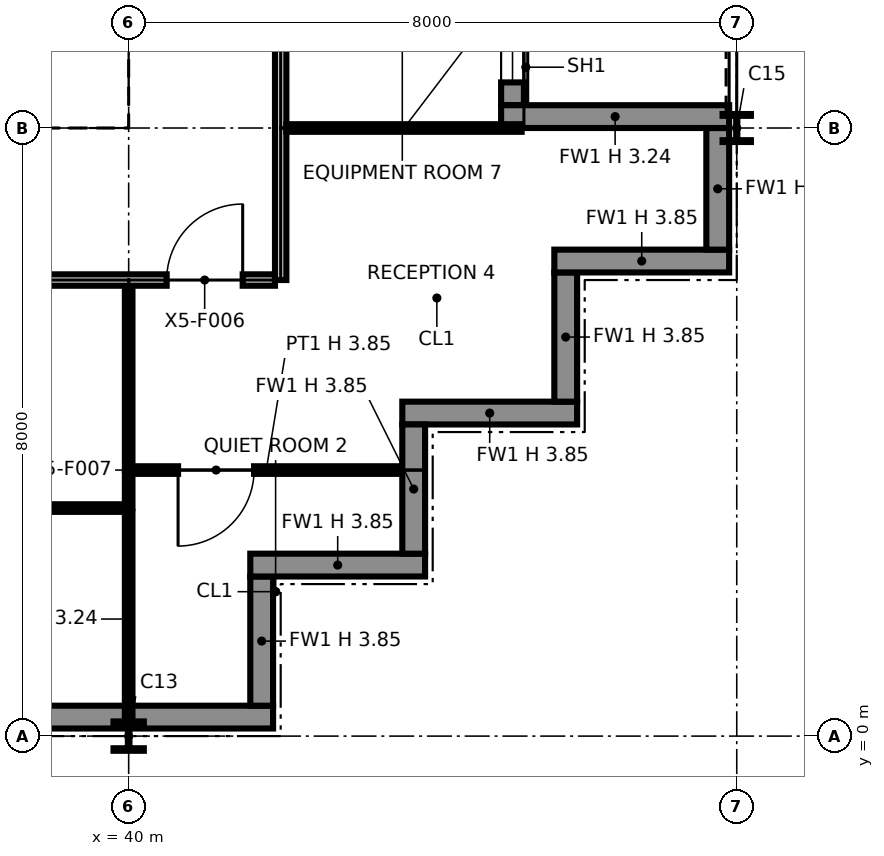
"""IFC4 building model, lengths in metres.
Left out: names, types, materials, properties, quantities, classifications, styles, units other than length and angle.
Written with IfcOpenShell. Run it as: python <this file> out.ifc"""

import sys

from ifc_helpers import new_model, si_unit, direction, frame, frame_2d, origin, origin_2d, place, context, subcontext, project, spatial, polyline, rectangle, i_section, outline, extrude, element, fill, save


model = new_model("IFC4")
c1 = context("Model", 3, precision=1e-05, world=origin(), true_north=direction((0.0, 1.0)))
c2 = subcontext(c1, "Body", "Model", "MODEL_VIEW")
j1 = project(units=[si_unit("LENGTHUNIT", "METRE"), si_unit("PLANEANGLEUNIT", "RADIAN")], contexts=[c1])
p1 = place(None, origin())
s1 = spatial("IfcSite", under=j1, at=p1, CompositionType="ELEMENT")
p2 = place(p1, origin())
s2 = spatial("IfcBuilding", under=s1, at=p2, CompositionType="ELEMENT")
p3 = place(p2, frame((0.0, 0.0, 283.0)))
s3 = spatial("IfcBuildingStorey", under=s2, at=p3, CompositionType="ELEMENT", Elevation=283.0)
p4 = place(p3, frame((40.0, 0.0, 0.0), z_axis=(0.0, 0.0, 1.0), x_axis=(1.0, 0.0, 0.0)))
e1 = element("IfcColumn", 1, at=p4, inside=s3, PredefinedType="COLUMN", context=c2, shape_type="SweptSolid", body=[
    extrude(i_section(OverallWidth=0.399, OverallDepth=0.386, WebThickness=0.021, FlangeThickness=0.033, at=origin_2d()), origin(), (0.0, 0.0, 1.0), 3.85),
])
p5 = place(p3, frame((40.0, 8.0, 0.0), z_axis=(0.0, 0.0, 1.0), x_axis=(1.0, 0.0, 0.0)))
e2 = element("IfcColumn", 2, at=p5, inside=s3, PredefinedType="COLUMN", context=c2, shape_type="SweptSolid", body=[
    extrude(i_section(OverallWidth=0.257, OverallDepth=0.363, WebThickness=0.013, FlangeThickness=0.022, at=origin_2d()), origin(), (0.0, 0.0, 1.0), 3.85),
])
p6 = place(p3, frame((48.0, 8.0, 0.0), z_axis=(0.0, 0.0, 1.0), x_axis=(1.0, 0.0, 0.0)))
e3 = element("IfcColumn", 3, at=p6, inside=s3, PredefinedType="COLUMN", context=c2, shape_type="SweptSolid", body=[
    extrude(i_section(OverallWidth=0.373, OverallDepth=0.368, WebThickness=0.015, FlangeThickness=0.024, at=origin_2d()), origin(), (0.0, 0.0, 1.0), 3.85),
])
p7 = place(p3, frame((32.0, 0.25, 0.0), z_axis=(0.0, 0.0, 1.0), x_axis=(1.0, 0.0, 0.0)))
e4 = element("IfcWall", 4, at=p7, inside=s3, PredefinedType="SOLIDWALL", context=c2, shape_type="SweptSolid", body=[
    extrude(rectangle(XDim=9.9, YDim=0.3, at=frame_2d((4.95, 0.0))), origin(), (0.0, 0.0, 1.0), 3.85),
])
p8 = place(p3, frame((41.75, 0.4, 0.0), z_axis=(0.0, 0.0, 1.0), x_axis=(0.0, 1.0, 0.0)))
e5 = element("IfcWall", 5, at=p8, inside=s3, PredefinedType="SOLIDWALL", context=c2, shape_type="SweptSolid", body=[
    extrude(rectangle(XDim=1.7, YDim=0.3, at=frame_2d((0.85, 0.0))), origin(), (0.0, 0.0, 1.0), 3.85),
])
p9 = place(p3, frame((41.6, 2.25, 0.0), z_axis=(0.0, 0.0, 1.0), x_axis=(1.0, 0.0, 0.0)))
e6 = element("IfcWall", 6, at=p9, inside=s3, PredefinedType="SOLIDWALL", context=c2, shape_type="SweptSolid", body=[
    extrude(rectangle(XDim=2.3, YDim=0.3, at=frame_2d((1.15, 0.0))), origin(), (0.0, 0.0, 1.0), 3.85),
])
p10 = place(p3, frame((43.75, 2.4, 0.0), z_axis=(0.0, 0.0, 1.0), x_axis=(0.0, 1.0, 0.0)))
e7 = element("IfcWall", 7, at=p10, inside=s3, PredefinedType="SOLIDWALL", context=c2, shape_type="SweptSolid", body=[
    extrude(rectangle(XDim=1.7, YDim=0.3, at=frame_2d((0.85, 0.0))), origin(), (0.0, 0.0, 1.0), 3.85),
])
p11 = place(p3, frame((43.6, 4.25, 0.0), z_axis=(0.0, 0.0, 1.0), x_axis=(1.0, 0.0, 0.0)))
e8 = element("IfcWall", 8, at=p11, inside=s3, PredefinedType="SOLIDWALL", context=c2, shape_type="SweptSolid", body=[
    extrude(rectangle(XDim=2.3, YDim=0.3, at=frame_2d((1.15, 0.0))), origin(), (0.0, 0.0, 1.0), 3.85),
])
p12 = place(p3, frame((45.75, 4.4, 0.0), z_axis=(0.0, 0.0, 1.0), x_axis=(0.0, 1.0, 0.0)))
e9 = element("IfcWall", 9, at=p12, inside=s3, PredefinedType="SOLIDWALL", context=c2, shape_type="SweptSolid", body=[
    extrude(rectangle(XDim=1.7, YDim=0.3, at=frame_2d((0.85, 0.0))), origin(), (0.0, 0.0, 1.0), 3.85),
])
p13 = place(p3, frame((45.6, 6.25, 0.0), z_axis=(0.0, 0.0, 1.0), x_axis=(1.0, 0.0, 0.0)))
e10 = element("IfcWall", 10, at=p13, inside=s3, PredefinedType="SOLIDWALL", context=c2, shape_type="SweptSolid", body=[
    extrude(rectangle(XDim=2.3, YDim=0.3, at=frame_2d((1.15, 0.0))), origin(), (0.0, 0.0, 1.0), 3.85),
])
p14 = place(p3, frame((47.75, 6.4, 0.0), z_axis=(0.0, 0.0, 1.0), x_axis=(0.0, 1.0, 0.0)))
e11 = element("IfcWall", 11, at=p14, inside=s3, PredefinedType="SOLIDWALL", context=c2, shape_type="SweptSolid", body=[
    extrude(rectangle(XDim=1.6, YDim=0.3, at=frame_2d((0.8, 0.0))), origin(), (0.0, 0.0, 1.0), 3.85),
])
p15 = place(p3, frame((45.05, 8.3, 0.0), z_axis=(0.0, 0.0, 1.0), x_axis=(0.0, 1.0, 0.0)))
e12 = element("IfcWall", 12, at=p15, inside=s3, PredefinedType="SOLIDWALL", context=c2, shape_type="SweptSolid", body=[
    extrude(rectangle(XDim=7.4, YDim=0.3, at=frame_2d((3.7, 0.0))), origin(), (0.0, 0.0, 1.0), 3.85),
])
p16 = place(p15, frame((0.3, 0.0, 0.9)))
e13 = element("IfcOpeningElement", 13, at=p16, cuts=e12, PredefinedType="OPENING", context=c2, shape_type="SweptSolid", body=[
    extrude(rectangle(XDim=2.8, YDim=2.2, at=frame_2d((1.4, 1.1))), frame((0.0, 0.16, 0.0), z_axis=(0.0, -1.0, 0.0), x_axis=(1.0, 0.0, 0.0)), (0.0, 0.0, 1.0), 0.32),
])
p17 = place(p15, frame((4.7, 0.0, 0.0)))
e14 = element("IfcOpeningElement", 14, at=p17, cuts=e12, PredefinedType="OPENING", context=c2, shape_type="SweptSolid", body=[
    extrude(rectangle(XDim=2.0, YDim=2.4, at=frame_2d((1.0, 1.2))), frame((0.0, 0.16, 0.0), z_axis=(0.0, -1.0, 0.0), x_axis=(1.0, 0.0, 0.0)), (0.0, 0.0, 1.0), 0.32),
])
p18 = place(p3, frame((47.9, 8.15, 0.0), z_axis=(0.0, 0.0, 1.0), x_axis=(-1.0, 0.0, 0.0)))
e15 = element("IfcWall", 15, at=p18, inside=s3, PredefinedType="SOLIDWALL", context=c2, shape_type="SweptSolid", body=[
    extrude(rectangle(XDim=3.0, YDim=0.3, at=frame_2d((1.5, 0.0))), origin(), (0.0, 0.0, 1.0), 3.237),
])
p19 = place(p3, frame((24.65, 8.75, 0.0), z_axis=(0.0, 0.0, 1.0), x_axis=(1.0, 0.0, 0.0)))
e16 = element("IfcWall", 16, at=p19, inside=s3, PredefinedType="PARTITIONING", context=c2, shape_type="SweptSolid", body=[
    extrude(outline(polyline([(0.0, 0.0), (14.7, 0.0), (14.7, 3.85), (7.438, 3.85), (7.437, 3.318), (7.263, 3.318), (7.262, 3.85), (0.0, 3.85), (0.0, 0.0)])), frame((0.0, 0.1, 0.0), z_axis=(0.0, -1.0, 0.0), x_axis=(1.0, 0.0, 0.0)), (0.0, 0.0, 1.0), 0.2),
])
p20 = place(p3, frame((39.25, 8.85, 0.0), z_axis=(0.0, 0.0, 1.0), x_axis=(0.0, 1.0, 0.0)))
e17 = element("IfcWall", 17, at=p20, inside=s3, PredefinedType="PARTITIONING", context=c2, shape_type="SweptSolid", body=[
    extrude(rectangle(XDim=6.3, YDim=0.2, at=frame_2d((3.15, 0.0))), origin(), (0.0, 0.0, 1.0), 3.85),
])
p21 = place(p3, frame((40.0, 0.13, 0.0), z_axis=(0.0, 0.0, 1.0), x_axis=(0.0, 1.0, 0.0)))
e18 = element("IfcWall", 18, at=p21, inside=s3, PredefinedType="PARTITIONING", context=c2, shape_type="SweptSolid", body=[
    extrude(rectangle(XDim=2.82, YDim=0.1, at=frame_2d((1.41, 0.0))), origin(), (0.0, 0.0, 1.0), 3.238),
])
p22 = place(p3, frame((32.05, 3.0, 0.0), z_axis=(0.0, 0.0, 1.0), x_axis=(1.0, 0.0, 0.0)))
e19 = element("IfcWall", 19, at=p22, inside=s3, PredefinedType="PARTITIONING", context=c2, shape_type="SweptSolid", body=[
    extrude(rectangle(XDim=7.9, YDim=0.1, at=frame_2d((3.95, 0.0))), origin(), (0.0, 0.0, 1.0), 3.85),
])
p23 = place(p22, frame((4.45, 0.0, 0.0), z_axis=(0.0, 0.0, 1.0), x_axis=(-1.0, 0.0, 0.0)))
e20 = element("IfcOpeningElement", 20, at=p23, cuts=e19, PredefinedType="OPENING", context=c2, shape_type="SweptSolid", body=[
    extrude(rectangle(XDim=1.0, YDim=2.1, at=frame_2d((0.5, 1.05))), frame((0.0, 0.06, 0.0), z_axis=(0.0, -1.0, 0.0), x_axis=(1.0, 0.0, 0.0)), (0.0, 0.0, 1.0), 0.12),
])
p24 = place(p3, frame((40.0, 3.0, 0.0), z_axis=(0.0, 0.0, 1.0), x_axis=(0.0, 1.0, 0.0)))
e21 = element("IfcWall", 21, at=p24, inside=s3, PredefinedType="PARTITIONING", context=c2, shape_type="SweptSolid", body=[
    extrude(rectangle(XDim=0.45, YDim=0.1, at=frame_2d((0.225, 0.0))), origin(), (0.0, 0.0, 1.0), 3.238),
])
p25 = place(p3, frame((40.05, 3.5, 0.0), z_axis=(0.0, 0.0, 1.0), x_axis=(1.0, 0.0, 0.0)))
e22 = element("IfcWall", 22, at=p25, inside=s3, PredefinedType="PARTITIONING", context=c2, shape_type="SweptSolid", body=[
    extrude(rectangle(XDim=3.52, YDim=0.1, at=frame_2d((1.76, 0.0))), origin(), (0.0, 0.0, 1.0), 3.85),
])
p26 = place(p25, frame((1.6, 0.0, 0.0), z_axis=(0.0, 0.0, 1.0), x_axis=(-1.0, 0.0, 0.0)))
e23 = element("IfcOpeningElement", 23, at=p26, cuts=e22, PredefinedType="OPENING", context=c2, shape_type="SweptSolid", body=[
    extrude(rectangle(XDim=1.0, YDim=2.1, at=frame_2d((0.5, 1.05))), frame((0.0, 0.06, 0.0), z_axis=(0.0, -1.0, 0.0), x_axis=(1.0, 0.0, 0.0)), (0.0, 0.0, 1.0), 0.12),
])
p27 = place(p3, frame((40.0, 3.5, 0.0), z_axis=(0.0, 0.0, 1.0), x_axis=(0.0, 1.0, 0.0)))
e24 = element("IfcWall", 24, at=p27, inside=s3, PredefinedType="PARTITIONING", context=c2, shape_type="SweptSolid", body=[
    extrude(rectangle(XDim=2.425, YDim=0.1, at=frame_2d((1.212, 0.0))), origin(), (0.0, 0.0, 1.0), 3.238),
])
p28 = place(p3, frame((6.075, 6.0, 0.0), z_axis=(0.0, 0.0, 1.0), x_axis=(1.0, 0.0, 0.0)))
e25 = element("IfcWall", 25, at=p28, inside=s3, PredefinedType="PARTITIONING", context=c2, shape_type="SweptSolid", body=[
    extrude(rectangle(XDim=35.85, YDim=0.15, at=frame_2d((17.925, 0.0))), origin(), (0.0, 0.0, 1.0), 3.85),
])
p29 = place(p28, frame((12.425, 0.0, 0.0), z_axis=(0.0, 0.0, 1.0), x_axis=(-1.0, 0.0, 0.0)))
e26 = element("IfcOpeningElement", 26, at=p29, cuts=e25, PredefinedType="OPENING", context=c2, shape_type="SweptSolid", body=[
    extrude(rectangle(XDim=1.0, YDim=2.1, at=frame_2d((0.5, 1.05))), frame((0.0, 0.085, 0.0), z_axis=(0.0, -1.0, 0.0), x_axis=(1.0, 0.0, 0.0)), (0.0, 0.0, 1.0), 0.17),
])
p30 = place(p28, frame((16.425, 0.0, 0.0), z_axis=(0.0, 0.0, 1.0), x_axis=(-1.0, 0.0, 0.0)))
e27 = element("IfcOpeningElement", 27, at=p30, cuts=e25, PredefinedType="OPENING", context=c2, shape_type="SweptSolid", body=[
    extrude(rectangle(XDim=1.0, YDim=2.1, at=frame_2d((0.5, 1.05))), frame((0.0, 0.085, 0.0), z_axis=(0.0, -1.0, 0.0), x_axis=(1.0, 0.0, 0.0)), (0.0, 0.0, 1.0), 0.17),
])
p31 = place(p28, frame((29.425, 0.0, 0.0)))
e28 = element("IfcOpeningElement", 28, at=p31, cuts=e25, PredefinedType="OPENING", context=c2, shape_type="SweptSolid", body=[
    extrude(rectangle(XDim=1.0, YDim=2.1, at=frame_2d((0.5, 1.05))), frame((0.0, 0.085, 0.0), z_axis=(0.0, -1.0, 0.0), x_axis=(1.0, 0.0, 0.0)), (0.0, 0.0, 1.0), 0.17),
])
p32 = place(p28, frame((34.425, 0.0, 0.0)))
e29 = element("IfcOpeningElement", 29, at=p32, cuts=e25, PredefinedType="OPENING", context=c2, shape_type="SweptSolid", body=[
    extrude(rectangle(XDim=1.0, YDim=2.1, at=frame_2d((0.5, 1.05))), frame((0.0, 0.085, 0.0), z_axis=(0.0, -1.0, 0.0), x_axis=(1.0, 0.0, 0.0)), (0.0, 0.0, 1.0), 0.17),
])
p33 = place(p28, frame((4.425, 0.0, 0.0), z_axis=(0.0, 0.0, 1.0), x_axis=(-1.0, 0.0, 0.0)))
e30 = element("IfcOpeningElement", 30, at=p33, cuts=e25, PredefinedType="OPENING", context=c2, shape_type="SweptSolid", body=[
    extrude(rectangle(XDim=1.0, YDim=2.1, at=frame_2d((0.5, 1.05))), frame((0.0, 0.085, 0.0), z_axis=(0.0, -1.0, 0.0), x_axis=(1.0, 0.0, 0.0)), (0.0, 0.0, 1.0), 0.17),
])
p34 = place(p28, frame((8.425, 0.0, 0.0), z_axis=(0.0, 0.0, 1.0), x_axis=(-1.0, 0.0, 0.0)))
e31 = element("IfcOpeningElement", 31, at=p34, cuts=e25, PredefinedType="OPENING", context=c2, shape_type="SweptSolid", body=[
    extrude(rectangle(XDim=1.0, YDim=2.1, at=frame_2d((0.5, 1.05))), frame((0.0, 0.085, 0.0), z_axis=(0.0, -1.0, 0.0), x_axis=(1.0, 0.0, 0.0)), (0.0, 0.0, 1.0), 0.17),
])
p35 = place(p28, frame((19.425, 0.0, 0.0), z_axis=(0.0, 0.0, 1.0), x_axis=(-1.0, 0.0, 0.0)))
e32 = element("IfcOpeningElement", 32, at=p35, cuts=e25, PredefinedType="OPENING", context=c2, shape_type="SweptSolid", body=[
    extrude(rectangle(XDim=1.0, YDim=2.1, at=frame_2d((0.5, 1.05))), frame((0.0, 0.085, 0.0), z_axis=(0.0, -1.0, 0.0), x_axis=(1.0, 0.0, 0.0)), (0.0, 0.0, 1.0), 0.17),
])
p36 = place(p28, frame((24.425, 0.0, 0.0), z_axis=(0.0, 0.0, 1.0), x_axis=(-1.0, 0.0, 0.0)))
e33 = element("IfcOpeningElement", 33, at=p36, cuts=e25, PredefinedType="OPENING", context=c2, shape_type="SweptSolid", body=[
    extrude(rectangle(XDim=1.0, YDim=2.1, at=frame_2d((0.5, 1.05))), frame((0.0, 0.085, 0.0), z_axis=(0.0, -1.0, 0.0), x_axis=(1.0, 0.0, 0.0)), (0.0, 0.0, 1.0), 0.17),
])
p37 = place(p3, frame((42.0, 6.0, 0.0), z_axis=(0.0, 0.0, 1.0), x_axis=(0.0, 1.0, 0.0)))
e34 = element("IfcWall", 34, at=p37, inside=s3, PredefinedType="PARTITIONING", context=c2, shape_type="SweptSolid", body=[
    extrude(outline(polyline([(0.0, 0.0), (11.925, 0.0), (11.925, 3.85), (10.3, 3.85), (10.298, 3.238), (9.702, 3.238), (9.7, 3.85), (6.3, 3.85), (6.298, 3.238), (5.702, 3.238), (5.7, 3.85), (2.3, 3.85), (2.298, 3.238), (1.702, 3.238), (1.7, 3.85), (0.0, 3.85), (0.0, 0.0)])), frame((0.0, 0.075, 0.0), z_axis=(0.0, -1.0, 0.0), x_axis=(1.0, 0.0, 0.0)), (0.0, 0.0, 1.0), 0.15),
])
p38 = place(p37, frame((4.5, 0.0, 0.0), z_axis=(0.0, 0.0, 1.0), x_axis=(-1.0, 0.0, 0.0)))
e35 = element("IfcOpeningElement", 35, at=p38, cuts=e34, PredefinedType="OPENING", context=c2, shape_type="SweptSolid", body=[
    extrude(rectangle(XDim=1.0, YDim=2.1, at=frame_2d((0.5, 1.05))), frame((0.0, 0.085, 0.0), z_axis=(0.0, -1.0, 0.0), x_axis=(1.0, 0.0, 0.0)), (0.0, 0.0, 1.0), 0.17),
])
p39 = place(p37, frame((8.5, 0.0, 0.0), z_axis=(0.0, 0.0, 1.0), x_axis=(-1.0, 0.0, 0.0)))
e36 = element("IfcOpeningElement", 36, at=p39, cuts=e34, PredefinedType="OPENING", context=c2, shape_type="SweptSolid", body=[
    extrude(rectangle(XDim=1.0, YDim=2.1, at=frame_2d((0.5, 1.05))), frame((0.0, 0.085, 0.0), z_axis=(0.0, -1.0, 0.0), x_axis=(1.0, 0.0, 0.0)), (0.0, 0.0, 1.0), 0.17),
])
p40 = place(p37, frame((10.5, 0.0, 0.0)))
e37 = element("IfcOpeningElement", 37, at=p40, cuts=e34, PredefinedType="OPENING", context=c2, shape_type="SweptSolid", body=[
    extrude(rectangle(XDim=1.0, YDim=2.1, at=frame_2d((0.5, 1.05))), frame((0.0, 0.085, 0.0), z_axis=(0.0, -1.0, 0.0), x_axis=(1.0, 0.0, 0.0)), (0.0, 0.0, 1.0), 0.17),
])
p41 = place(p3, frame((42.075, 8.0, 0.0), z_axis=(0.0, 0.0, 1.0), x_axis=(1.0, 0.0, 0.0)))
e38 = element("IfcWall", 38, at=p41, inside=s3, PredefinedType="PARTITIONING", context=c2, shape_type="SweptSolid", body=[
    extrude(rectangle(XDim=3.095, YDim=0.1, at=frame_2d((1.547, 0.0))), origin(), (0.0, 0.0, 1.0), 3.238),
])
p42 = place(p16, origin())
e39 = element("IfcWindow", 39, at=p42, inside=s3, PartitioningType="SINGLE_PANEL", PredefinedType="WINDOW", context=c2, shape_type="SweptSolid", body=[
    extrude(rectangle(XDim=2.8, YDim=2.2, at=frame_2d((1.4, 1.1))), frame((0.0, 0.03, 0.0), z_axis=(0.0, -1.0, 0.0), x_axis=(1.0, 0.0, 0.0)), (0.0, 0.0, 1.0), 0.06),
])
fill(e13, e39)
p43 = place(p32, origin())
e40 = element("IfcDoor", 40, at=p43, inside=s3, OperationType="SINGLE_SWING_RIGHT", PredefinedType="DOOR", context=c2, shape_type="SweptSolid", body=[
    extrude(rectangle(XDim=1.0, YDim=2.1, at=frame_2d((0.5, 1.05))), frame((0.0, 0.025, 0.0), z_axis=(0.0, -1.0, 0.0), x_axis=(1.0, 0.0, 0.0)), (0.0, 0.0, 1.0), 0.05),
])
fill(e29, e40)
p44 = place(p26, origin())
e41 = element("IfcDoor", 41, at=p44, inside=s3, OperationType="SINGLE_SWING_RIGHT", PredefinedType="DOOR", context=c2, shape_type="SweptSolid", body=[
    extrude(rectangle(XDim=1.0, YDim=2.1, at=frame_2d((0.5, 1.05))), frame((0.0, 0.025, 0.0), z_axis=(0.0, -1.0, 0.0), x_axis=(1.0, 0.0, 0.0)), (0.0, 0.0, 1.0), 0.05),
])
fill(e23, e41)
save(model, sys.argv[1])
